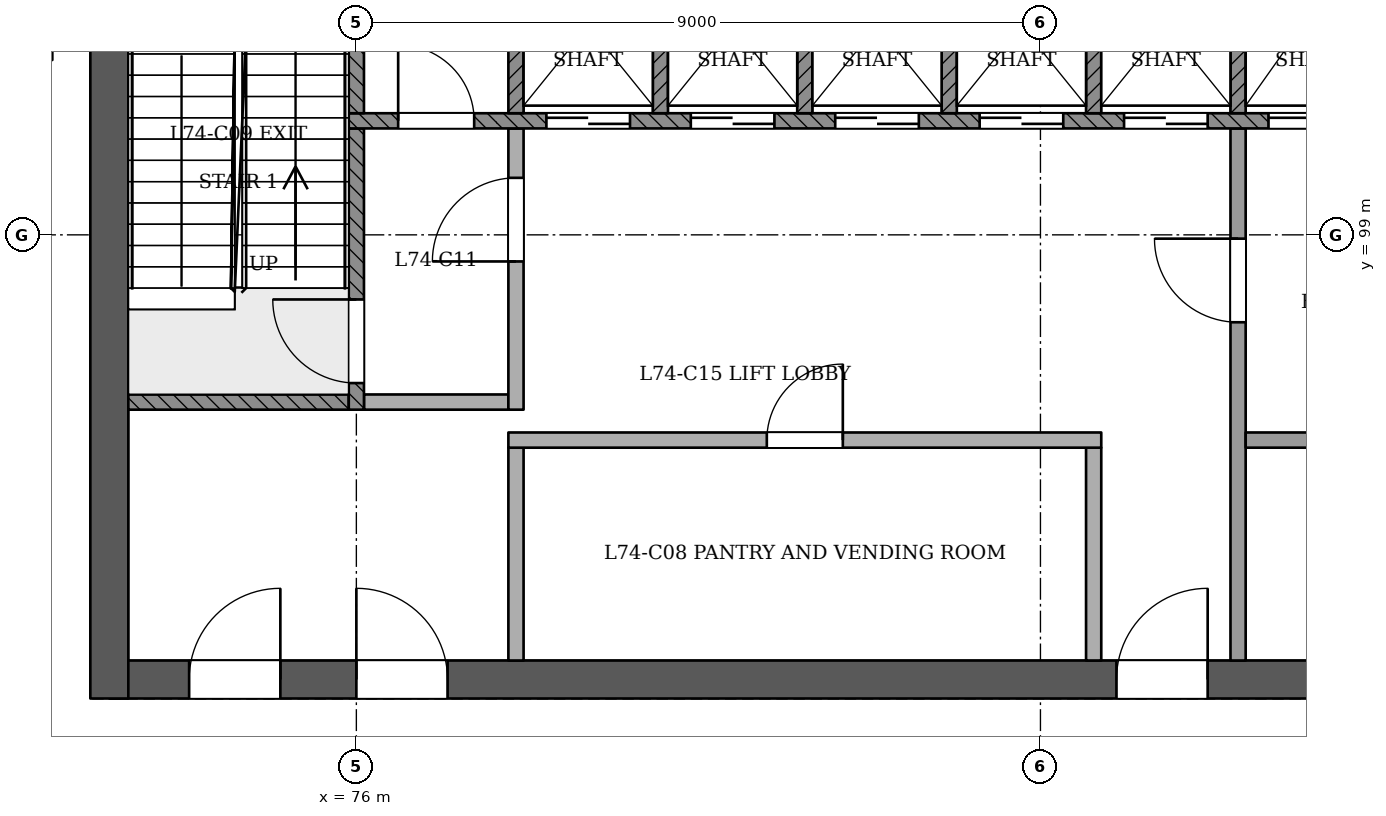
"""IFC4 building model, lengths in metres.
Left out: names, types, materials, properties, quantities, classifications, styles, units other than length and angle.
Written with IfcOpenShell. Run it as: python <this file> out.ifc"""

import sys

from ifc_helpers import new_model, si_unit, direction, frame, frame_2d, origin, place, context, subcontext, project, spatial, rectangle, extrude, element, fill, save


model = new_model("IFC4")
c1 = context("Model", 3, precision=1e-05, world=origin(), true_north=direction((0.0, 1.0)))
c2 = subcontext(c1, "Body", "Model", "MODEL_VIEW")
j1 = project(units=[si_unit("LENGTHUNIT", "METRE"), si_unit("PLANEANGLEUNIT", "RADIAN")], contexts=[c1])
p1 = place(None, origin())
s1 = spatial("IfcSite", under=j1, at=p1, CompositionType="ELEMENT")
p2 = place(p1, origin())
s2 = spatial("IfcBuilding", under=s1, at=p2, CompositionType="ELEMENT")
p3 = place(p2, frame((0.0, 0.0, 286.0)))
s3 = spatial("IfcBuildingStorey", under=s2, at=p3, CompositionType="ELEMENT", Elevation=286.0)
p4 = place(p3, frame((72.75, 93.15, 0.0), z_axis=(0.0, 0.0, 1.0), x_axis=(1.0, 0.0, 0.0)))
e1 = element("IfcWall", 1, at=p4, inside=s3, PredefinedType="SHEAR", context=c2, shape_type="SweptSolid", body=[
    extrude(rectangle(XDim=24.75, YDim=0.5, at=frame_2d((12.375, 0.0))), origin(), (0.0, 0.0, 1.0), 5.4),
])
p5 = place(p4, frame((1.05, 0.0, 0.0)))
e2 = element("IfcOpeningElement", 2, at=p5, cuts=e1, PredefinedType="OPENING", context=c2, shape_type="SweptSolid", body=[
    extrude(rectangle(XDim=1.2, YDim=2.1, at=frame_2d((0.6, 1.05))), frame((0.0, 0.26, 0.0), z_axis=(0.0, -1.0, 0.0), x_axis=(1.0, 0.0, 0.0)), (0.0, 0.0, 1.0), 0.521),
])
p6 = place(p4, frame((3.25, 0.0, 0.0)))
e3 = element("IfcOpeningElement", 3, at=p6, cuts=e1, PredefinedType="OPENING", context=c2, shape_type="SweptSolid", body=[
    extrude(rectangle(XDim=1.2, YDim=2.1, at=frame_2d((0.6, 1.05))), frame((0.0, 0.26, 0.0), z_axis=(0.0, -1.0, 0.0), x_axis=(1.0, 0.0, 0.0)), (0.0, 0.0, 1.0), 0.521),
])
p7 = place(p4, frame((13.25, 0.0, 0.0)))
e4 = element("IfcOpeningElement", 4, at=p7, cuts=e1, PredefinedType="OPENING", context=c2, shape_type="SweptSolid", body=[
    extrude(rectangle(XDim=1.2, YDim=2.1, at=frame_2d((0.6, 1.05))), frame((0.0, 0.26, 0.0), z_axis=(0.0, -1.0, 0.0), x_axis=(1.0, 0.0, 0.0)), (0.0, 0.0, 1.0), 0.521),
])
p8 = place(p4, frame((21.55, 0.0, 0.0)))
e5 = element("IfcOpeningElement", 5, at=p8, cuts=e1, PredefinedType="OPENING", context=c2, shape_type="SweptSolid", body=[
    extrude(rectangle(XDim=1.2, YDim=2.1, at=frame_2d((0.6, 1.05))), frame((0.0, 0.26, 0.0), z_axis=(0.0, -1.0, 0.0), x_axis=(1.0, 0.0, 0.0)), (0.0, 0.0, 1.0), 0.521),
])
p9 = place(p3, frame((72.75, 103.65, 0.0), z_axis=(0.0, 0.0, 1.0), x_axis=(0.0, -1.0, 0.0)))
e6 = element("IfcWall", 6, at=p9, inside=s3, PredefinedType="SHEAR", context=c2, shape_type="SweptSolid", body=[
    extrude(rectangle(XDim=10.75, YDim=0.5, at=frame_2d((5.375, 0.0))), origin(), (0.0, 0.0, 1.0), 5.4),
])
for number, where, z_axis, x_axis in (
    (7, (78.1, 93.4, 0.0), (0.0, 0.0, 1.0), (0.0, 1.0, 0.0)),
    (8, (85.7, 93.4, 0.0), (0.0, 0.0, 1.0), (0.0, 1.0, 0.0)),
):
    element("IfcWall", number, at=place(p3, frame(where, z_axis=z_axis, x_axis=x_axis)), inside=s3, PredefinedType="PARTITIONING", context=c2, shape_type="SweptSolid", body=[
        extrude(rectangle(XDim=2.8, YDim=0.2, at=frame_2d((1.4, 0.0))), origin(), (0.0, 0.0, 1.0), 5.0),
    ])
p10 = place(p3, frame((87.6, 93.4, 0.0), z_axis=(0.0, 0.0, 1.0), x_axis=(0.0, 1.0, 0.0)))
e9 = element("IfcWall", 9, at=p10, inside=s3, PredefinedType="PARTITIONING", context=c2, shape_type="SweptSolid", body=[
    extrude(rectangle(XDim=7.0, YDim=0.2, at=frame_2d((3.5, 0.0))), origin(), (0.0, 0.0, 1.0), 5.0),
])
p11 = place(p10, frame((4.45, 0.0, 0.0)))
e10 = element("IfcOpeningElement", 10, at=p11, cuts=e9, PredefinedType="OPENING", context=c2, shape_type="SweptSolid", body=[
    extrude(rectangle(XDim=1.1, YDim=2.1, at=frame_2d((0.55, 1.05))), frame((0.0, 0.11, 0.0), z_axis=(0.0, -1.0, 0.0), x_axis=(1.0, 0.0, 0.0)), (0.0, 0.0, 1.0), 0.221),
])
p12 = place(p3, frame((78.0, 96.3, 0.0), z_axis=(0.0, 0.0, 1.0), x_axis=(1.0, 0.0, 0.0)))
e11 = element("IfcWall", 11, at=p12, inside=s3, PredefinedType="PARTITIONING", context=c2, shape_type="SweptSolid", body=[
    extrude(rectangle(XDim=7.8, YDim=0.2, at=frame_2d((3.9, 0.0))), origin(), (0.0, 0.0, 1.0), 5.0),
])
p13 = place(p12, frame((3.4, 0.0, 0.0)))
e12 = element("IfcOpeningElement", 12, at=p13, cuts=e11, PredefinedType="OPENING", context=c2, shape_type="SweptSolid", body=[
    extrude(rectangle(XDim=1.0, YDim=2.1, at=frame_2d((0.5, 1.05))), frame((0.0, 0.11, 0.0), z_axis=(0.0, -1.0, 0.0), x_axis=(1.0, 0.0, 0.0)), (0.0, 0.0, 1.0), 0.221),
])
p14 = place(p3, frame((87.7, 96.3, 0.0), z_axis=(0.0, 0.0, 1.0), x_axis=(1.0, 0.0, 0.0)))
e13 = element("IfcWall", 13, at=p14, inside=s3, PredefinedType="PARTITIONING", context=c2, shape_type="SweptSolid", body=[
    extrude(rectangle(XDim=3.6, YDim=0.2, at=frame_2d((1.8, 0.0))), origin(), (0.0, 0.0, 1.0), 5.0),
])
p15 = place(p3, frame((73.0, 96.8, 0.0), z_axis=(0.0, 0.0, 1.0), x_axis=(1.0, 0.0, 0.0)))
e14 = element("IfcWall", 14, at=p15, inside=s3, PredefinedType="SOLIDWALL", context=c2, shape_type="SweptSolid", body=[
    extrude(rectangle(XDim=2.9, YDim=0.2, at=frame_2d((1.45, 0.0))), origin(), (0.0, 0.0, 1.0), 5.0),
])
p16 = place(p3, frame((76.0, 96.7, 0.0), z_axis=(0.0, 0.0, 1.0), x_axis=(0.0, 1.0, 0.0)))
e15 = element("IfcWall", 15, at=p16, inside=s3, PredefinedType="SOLIDWALL", context=c2, shape_type="SweptSolid", body=[
    extrude(rectangle(XDim=3.7, YDim=0.2, at=frame_2d((1.85, 0.0))), origin(), (0.0, 0.0, 1.0), 5.0),
])
p17 = place(p16, frame((0.35, 0.0, 0.0)))
e16 = element("IfcOpeningElement", 16, at=p17, cuts=e15, PredefinedType="OPENING", context=c2, shape_type="SweptSolid", body=[
    extrude(rectangle(XDim=1.1, YDim=2.1, at=frame_2d((0.55, 1.05))), frame((0.0, 0.11, 0.0), z_axis=(0.0, -1.0, 0.0), x_axis=(1.0, 0.0, 0.0)), (0.0, 0.0, 1.0), 0.221),
])
p18 = place(p3, frame((76.1, 96.8, 0.0), z_axis=(0.0, 0.0, 1.0), x_axis=(1.0, 0.0, 0.0)))
e17 = element("IfcWall", 17, at=p18, inside=s3, PredefinedType="PARTITIONING", context=c2, shape_type="SweptSolid", body=[
    extrude(rectangle(XDim=1.9, YDim=0.2, at=frame_2d((0.95, 0.0))), origin(), (0.0, 0.0, 1.0), 5.0),
])
p19 = place(p3, frame((78.1, 96.7, 0.0), z_axis=(0.0, 0.0, 1.0), x_axis=(0.0, 1.0, 0.0)))
e18 = element("IfcWall", 18, at=p19, inside=s3, PredefinedType="PARTITIONING", context=c2, shape_type="SweptSolid", body=[
    extrude(rectangle(XDim=3.7, YDim=0.2, at=frame_2d((1.85, 0.0))), origin(), (0.0, 0.0, 1.0), 5.0),
])
p20 = place(p19, frame((1.95, 0.0, 0.0)))
e19 = element("IfcOpeningElement", 19, at=p20, cuts=e18, PredefinedType="OPENING", context=c2, shape_type="SweptSolid", body=[
    extrude(rectangle(XDim=1.1, YDim=2.1, at=frame_2d((0.55, 1.05))), frame((0.0, 0.11, 0.0), z_axis=(0.0, -1.0, 0.0), x_axis=(1.0, 0.0, 0.0)), (0.0, 0.0, 1.0), 0.221),
])
p21 = place(p3, frame((75.9, 100.5, 0.0), z_axis=(0.0, 0.0, 1.0), x_axis=(1.0, 0.0, 0.0)))
e20 = element("IfcWall", 20, at=p21, inside=s3, PredefinedType="SOLIDWALL", context=c2, shape_type="SweptSolid", body=[
    extrude(rectangle(XDim=18.2, YDim=0.2, at=frame_2d((9.1, 0.0))), origin(), (0.0, 0.0, 1.0), 5.0),
])
p22 = place(p21, frame((2.6, 0.0, 0.0)))
e21 = element("IfcOpeningElement", 21, at=p22, cuts=e20, PredefinedType="OPENING", context=c2, shape_type="SweptSolid", body=[
    extrude(rectangle(XDim=1.1, YDim=2.1, at=frame_2d((0.55, 1.05))), frame((0.0, 0.11, 0.0), z_axis=(0.0, -1.0, 0.0), x_axis=(1.0, 0.0, 0.0)), (0.0, 0.0, 1.0), 0.221),
])
p23 = place(p21, frame((4.5, 0.0, 0.0)))
e22 = element("IfcOpeningElement", 22, at=p23, cuts=e20, PredefinedType="OPENING", context=c2, shape_type="SweptSolid", body=[
    extrude(rectangle(XDim=1.1, YDim=2.1, at=frame_2d((0.55, 1.05))), frame((0.0, 0.11, 0.0), z_axis=(0.0, -1.0, 0.0), x_axis=(1.0, 0.0, 0.0)), (0.0, 0.0, 1.0), 0.221),
])
p24 = place(p21, frame((6.4, 0.0, 0.0)))
e23 = element("IfcOpeningElement", 23, at=p24, cuts=e20, PredefinedType="OPENING", context=c2, shape_type="SweptSolid", body=[
    extrude(rectangle(XDim=1.1, YDim=2.1, at=frame_2d((0.55, 1.05))), frame((0.0, 0.11, 0.0), z_axis=(0.0, -1.0, 0.0), x_axis=(1.0, 0.0, 0.0)), (0.0, 0.0, 1.0), 0.221),
])
p25 = place(p21, frame((8.3, 0.0, 0.0)))
e24 = element("IfcOpeningElement", 24, at=p25, cuts=e20, PredefinedType="OPENING", context=c2, shape_type="SweptSolid", body=[
    extrude(rectangle(XDim=1.1, YDim=2.1, at=frame_2d((0.55, 1.05))), frame((0.0, 0.11, 0.0), z_axis=(0.0, -1.0, 0.0), x_axis=(1.0, 0.0, 0.0)), (0.0, 0.0, 1.0), 0.221),
])
p26 = place(p21, frame((10.2, 0.0, 0.0)))
e25 = element("IfcOpeningElement", 25, at=p26, cuts=e20, PredefinedType="OPENING", context=c2, shape_type="SweptSolid", body=[
    extrude(rectangle(XDim=1.1, YDim=2.1, at=frame_2d((0.55, 1.05))), frame((0.0, 0.11, 0.0), z_axis=(0.0, -1.0, 0.0), x_axis=(1.0, 0.0, 0.0)), (0.0, 0.0, 1.0), 0.221),
])
p27 = place(p21, frame((12.1, 0.0, 0.0)))
e26 = element("IfcOpeningElement", 26, at=p27, cuts=e20, PredefinedType="OPENING", context=c2, shape_type="SweptSolid", body=[
    extrude(rectangle(XDim=1.1, YDim=2.1, at=frame_2d((0.55, 1.05))), frame((0.0, 0.11, 0.0), z_axis=(0.0, -1.0, 0.0), x_axis=(1.0, 0.0, 0.0)), (0.0, 0.0, 1.0), 0.221),
])
p28 = place(p21, frame((14.0, 0.0, 0.0)))
e27 = element("IfcOpeningElement", 27, at=p28, cuts=e20, PredefinedType="OPENING", context=c2, shape_type="SweptSolid", body=[
    extrude(rectangle(XDim=1.1, YDim=2.1, at=frame_2d((0.55, 1.05))), frame((0.0, 0.11, 0.0), z_axis=(0.0, -1.0, 0.0), x_axis=(1.0, 0.0, 0.0)), (0.0, 0.0, 1.0), 0.221),
])
p29 = place(p21, frame((0.65, 0.0, 0.0)))
e28 = element("IfcOpeningElement", 28, at=p29, cuts=e20, PredefinedType="OPENING", context=c2, shape_type="SweptSolid", body=[
    extrude(rectangle(XDim=1.0, YDim=2.1, at=frame_2d((0.5, 1.05))), frame((0.0, 0.11, 0.0), z_axis=(0.0, -1.0, 0.0), x_axis=(1.0, 0.0, 0.0)), (0.0, 0.0, 1.0), 0.221),
])
p30 = place(p21, frame((16.3, 0.0, 0.0)))
e29 = element("IfcOpeningElement", 29, at=p30, cuts=e20, PredefinedType="OPENING", context=c2, shape_type="SweptSolid", body=[
    extrude(rectangle(XDim=1.0, YDim=2.1, at=frame_2d((0.5, 1.05))), frame((0.0, 0.11, 0.0), z_axis=(0.0, -1.0, 0.0), x_axis=(1.0, 0.0, 0.0)), (0.0, 0.0, 1.0), 0.221),
])
for number, where, z_axis, x_axis in (
    (30, (76.0, 100.6, 0.0), (0.0, 0.0, 1.0), (0.0, 1.0, 0.0)),
    (31, (78.1, 100.6, 0.0), (0.0, 0.0, 1.0), (0.0, 1.0, 0.0)),
    (32, (80.0, 100.6, 0.0), (0.0, 0.0, 1.0), (0.0, 1.0, 0.0)),
    (33, (81.9, 100.6, 0.0), (0.0, 0.0, 1.0), (0.0, 1.0, 0.0)),
    (34, (83.8, 100.6, 0.0), (0.0, 0.0, 1.0), (0.0, 1.0, 0.0)),
    (35, (85.7, 100.6, 0.0), (0.0, 0.0, 1.0), (0.0, 1.0, 0.0)),
    (36, (87.6, 100.6, 0.0), (0.0, 0.0, 1.0), (0.0, 1.0, 0.0)),
):
    element("IfcWall", number, at=place(p3, frame(where, z_axis=z_axis, x_axis=x_axis)), inside=s3, PredefinedType="SOLIDWALL", context=c2, shape_type="SweptSolid", body=[
        extrude(rectangle(XDim=2.8, YDim=0.2, at=frame_2d((1.4, 0.0))), origin(), (0.0, 0.0, 1.0), 5.0),
    ])
p31 = place(p22, origin())
e37 = element("IfcDoor", 37, at=p31, inside=s3, OperationType="SLIDING_TO_RIGHT", PredefinedType="NOTDEFINED", context=c2, shape_type="SweptSolid", body=[
    extrude(rectangle(XDim=1.1, YDim=2.1, at=frame_2d((0.55, 1.05))), frame((0.0, 0.025, 0.0), z_axis=(0.0, -1.0, 0.0), x_axis=(1.0, 0.0, 0.0)), (0.0, 0.0, 1.0), 0.05),
])
fill(e21, e37)
p32 = place(p23, origin())
e38 = element("IfcDoor", 38, at=p32, inside=s3, OperationType="SLIDING_TO_LEFT", PredefinedType="NOTDEFINED", context=c2, shape_type="SweptSolid", body=[
    extrude(rectangle(XDim=1.1, YDim=2.1, at=frame_2d((0.55, 1.05))), frame((0.0, 0.025, 0.0), z_axis=(0.0, -1.0, 0.0), x_axis=(1.0, 0.0, 0.0)), (0.0, 0.0, 1.0), 0.05),
])
fill(e22, e38)
p33 = place(p24, origin())
e39 = element("IfcDoor", 39, at=p33, inside=s3, OperationType="SLIDING_TO_RIGHT", PredefinedType="NOTDEFINED", context=c2, shape_type="SweptSolid", body=[
    extrude(rectangle(XDim=1.1, YDim=2.1, at=frame_2d((0.55, 1.05))), frame((0.0, 0.025, 0.0), z_axis=(0.0, -1.0, 0.0), x_axis=(1.0, 0.0, 0.0)), (0.0, 0.0, 1.0), 0.05),
])
fill(e23, e39)
p34 = place(p25, origin())
e40 = element("IfcDoor", 40, at=p34, inside=s3, OperationType="SLIDING_TO_LEFT", PredefinedType="NOTDEFINED", context=c2, shape_type="SweptSolid", body=[
    extrude(rectangle(XDim=1.1, YDim=2.1, at=frame_2d((0.55, 1.05))), frame((0.0, 0.025, 0.0), z_axis=(0.0, -1.0, 0.0), x_axis=(1.0, 0.0, 0.0)), (0.0, 0.0, 1.0), 0.05),
])
fill(e24, e40)
p35 = place(p26, origin())
e41 = element("IfcDoor", 41, at=p35, inside=s3, OperationType="SLIDING_TO_RIGHT", PredefinedType="NOTDEFINED", context=c2, shape_type="SweptSolid", body=[
    extrude(rectangle(XDim=1.1, YDim=2.1, at=frame_2d((0.55, 1.05))), frame((0.0, 0.025, 0.0), z_axis=(0.0, -1.0, 0.0), x_axis=(1.0, 0.0, 0.0)), (0.0, 0.0, 1.0), 0.05),
])
fill(e25, e41)
p36 = place(p27, origin())
e42 = element("IfcDoor", 42, at=p36, inside=s3, OperationType="SLIDING_TO_RIGHT", PredefinedType="NOTDEFINED", context=c2, shape_type="SweptSolid", body=[
    extrude(rectangle(XDim=1.1, YDim=2.1, at=frame_2d((0.55, 1.05))), frame((0.0, 0.025, 0.0), z_axis=(0.0, -1.0, 0.0), x_axis=(1.0, 0.0, 0.0)), (0.0, 0.0, 1.0), 0.05),
])
fill(e26, e42)
p37 = place(p17, origin())
e43 = element("IfcDoor", 43, at=p37, inside=s3, OperationType="SINGLE_SWING_RIGHT", PredefinedType="NOTDEFINED", context=c2, shape_type="SweptSolid", body=[
    extrude(rectangle(XDim=1.1, YDim=2.1, at=frame_2d((0.55, 1.05))), frame((0.0, 0.025, 0.0), z_axis=(0.0, -1.0, 0.0), x_axis=(1.0, 0.0, 0.0)), (0.0, 0.0, 1.0), 0.05),
])
fill(e16, e43)
p38 = place(p20, origin())
e44 = element("IfcDoor", 44, at=p38, inside=s3, OperationType="SINGLE_SWING_LEFT", PredefinedType="NOTDEFINED", context=c2, shape_type="SweptSolid", body=[
    extrude(rectangle(XDim=1.1, YDim=2.1, at=frame_2d((0.55, 1.05))), frame((0.0, 0.025, 0.0), z_axis=(0.0, -1.0, 0.0), x_axis=(1.0, 0.0, 0.0)), (0.0, 0.0, 1.0), 0.05),
])
fill(e19, e44)
p39 = place(p11, origin())
e45 = element("IfcDoor", 45, at=p39, inside=s3, OperationType="SINGLE_SWING_RIGHT", PredefinedType="NOTDEFINED", context=c2, shape_type="SweptSolid", body=[
    extrude(rectangle(XDim=1.1, YDim=2.1, at=frame_2d((0.55, 1.05))), frame((0.0, 0.025, 0.0), z_axis=(0.0, -1.0, 0.0), x_axis=(1.0, 0.0, 0.0)), (0.0, 0.0, 1.0), 0.05),
])
fill(e10, e45)
p40 = place(p5, origin())
e46 = element("IfcDoor", 46, at=p40, inside=s3, OperationType="SINGLE_SWING_RIGHT", PredefinedType="NOTDEFINED", context=c2, shape_type="SweptSolid", body=[
    extrude(rectangle(XDim=1.2, YDim=2.1, at=frame_2d((0.6, 1.05))), frame((0.0, 0.025, 0.0), z_axis=(0.0, -1.0, 0.0), x_axis=(1.0, 0.0, 0.0)), (0.0, 0.0, 1.0), 0.05),
])
fill(e2, e46)
p41 = place(p6, origin())
e47 = element("IfcDoor", 47, at=p41, inside=s3, OperationType="SINGLE_SWING_LEFT", PredefinedType="NOTDEFINED", context=c2, shape_type="SweptSolid", body=[
    extrude(rectangle(XDim=1.2, YDim=2.1, at=frame_2d((0.6, 1.05))), frame((0.0, 0.025, 0.0), z_axis=(0.0, -1.0, 0.0), x_axis=(1.0, 0.0, 0.0)), (0.0, 0.0, 1.0), 0.05),
])
fill(e3, e47)
p42 = place(p7, origin())
e48 = element("IfcDoor", 48, at=p42, inside=s3, OperationType="SINGLE_SWING_RIGHT", PredefinedType="NOTDEFINED", context=c2, shape_type="SweptSolid", body=[
    extrude(rectangle(XDim=1.2, YDim=2.1, at=frame_2d((0.6, 1.05))), frame((0.0, 0.025, 0.0), z_axis=(0.0, -1.0, 0.0), x_axis=(1.0, 0.0, 0.0)), (0.0, 0.0, 1.0), 0.05),
])
fill(e4, e48)
p43 = place(p29, origin())
e49 = element("IfcDoor", 49, at=p43, inside=s3, OperationType="SINGLE_SWING_LEFT", PredefinedType="NOTDEFINED", context=c2, shape_type="SweptSolid", body=[
    extrude(rectangle(XDim=1.0, YDim=2.1, at=frame_2d((0.5, 1.05))), frame((0.0, 0.025, 0.0), z_axis=(0.0, -1.0, 0.0), x_axis=(1.0, 0.0, 0.0)), (0.0, 0.0, 1.0), 0.05),
])
fill(e28, e49)
p44 = place(p13, origin())
e50 = element("IfcDoor", 50, at=p44, inside=s3, OperationType="SINGLE_SWING_RIGHT", PredefinedType="NOTDEFINED", context=c2, shape_type="SweptSolid", body=[
    extrude(rectangle(XDim=1.0, YDim=2.1, at=frame_2d((0.5, 1.05))), frame((0.0, 0.025, 0.0), z_axis=(0.0, -1.0, 0.0), x_axis=(1.0, 0.0, 0.0)), (0.0, 0.0, 1.0), 0.05),
])
fill(e12, e50)
save(model, sys.argv[1])
